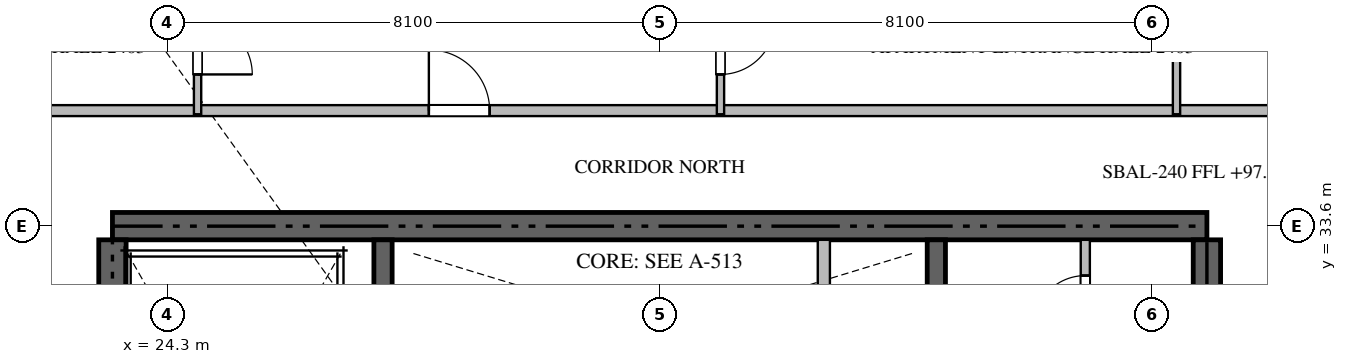
"""IFC4 building model, lengths in metres.
Left out: names, types, materials, properties, quantities, classifications, styles, units other than length and angle.
Written with IfcOpenShell. Run it as: python <this file> out.ifc"""

import sys

from ifc_helpers import new_model, si_unit, direction, frame, frame_2d, origin, place, context, subcontext, project, spatial, rectangle, extrude, source, transform, mapped, element, fill, save


model = new_model("IFC4")
c1 = context("Model", 3, precision=1e-05, world=origin(), true_north=direction((0.0, 1.0)))
c2 = subcontext(c1, "Body", "Model", "MODEL_VIEW")
j1 = project(units=[si_unit("LENGTHUNIT", "METRE"), si_unit("PLANEANGLEUNIT", "RADIAN")], contexts=[c1])
p1 = place(None, origin())
s1 = spatial("IfcSite", under=j1, at=p1, CompositionType="ELEMENT")
p2 = place(p1, origin())
s2 = spatial("IfcBuilding", under=s1, at=p2, CompositionType="ELEMENT")
p3 = place(p2, frame((0.0, 0.0, 97.95)))
s3 = spatial("IfcBuildingStorey", under=s2, at=p3, CompositionType="ELEMENT", Elevation=97.95)
p4 = place(p3, frame((41.4, 33.6, -0.26), z_axis=(0.0, 0.0, 1.0), x_axis=(-1.0, 0.0, 0.0)))
e1 = element("IfcWall", 1, at=p4, inside=s3, PredefinedType="SHEAR", context=c2, shape_type="SweptSolid", body=[
    extrude(rectangle(XDim=18.0, YDim=0.45, at=frame_2d((9.0, 0.0))), origin(), (0.0, 0.0, 1.0), 3.748),
])
p5 = place(p3, frame((23.4, 24.25, -0.26), z_axis=(0.0, 0.0, 1.0), x_axis=(0.0, 1.0, 0.0)))
e2 = element("IfcWall", 2, at=p5, inside=s3, PredefinedType="SHEAR", context=c2, shape_type="SweptSolid", body=[
    extrude(rectangle(XDim=9.125, YDim=0.45, at=frame_2d((4.562, 0.0))), origin(), (0.0, 0.0, 1.0), 3.748),
])
p6 = place(p3, frame((41.4, 27.75, -0.26), z_axis=(0.0, 0.0, 1.0), x_axis=(0.0, 1.0, 0.0)))
e3 = element("IfcWall", 3, at=p6, inside=s3, PredefinedType="SHEAR", context=c2, shape_type="SweptSolid", body=[
    extrude(rectangle(XDim=5.625, YDim=0.45, at=frame_2d((2.812, 0.0))), origin(), (0.0, 0.0, 1.0), 3.748),
])
p7 = place(p3, frame((27.85, 23.55, -0.26), z_axis=(0.0, 0.0, 1.0), x_axis=(0.0, 1.0, 0.0)))
e4 = element("IfcWall", 4, at=p7, inside=s3, PredefinedType="SHEAR", context=c2, shape_type="SweptSolid", body=[
    extrude(rectangle(XDim=9.825, YDim=0.3, at=frame_2d((4.913, 0.0))), origin(), (0.0, 0.0, 1.0), 3.748),
])
p8 = place(p3, frame((36.95, 27.05, -0.26), z_axis=(0.0, 0.0, 1.0), x_axis=(0.0, 1.0, 0.0)))
e5 = element("IfcWall", 5, at=p8, inside=s3, PredefinedType="SHEAR", context=c2, shape_type="SweptSolid", body=[
    extrude(rectangle(XDim=6.325, YDim=0.3, at=frame_2d((3.163, 0.0))), origin(), (0.0, 0.0, 1.0), 3.748),
])
p9 = place(p3, frame((35.1, 30.75, 0.0), z_axis=(0.0, 0.0, 1.0), x_axis=(0.0, 1.0, 0.0)))
e6 = element("IfcWall", 6, at=p9, inside=s3, PredefinedType="STANDARD", context=c2, shape_type="SweptSolid", body=[
    extrude(rectangle(XDim=2.625, YDim=0.2, at=frame_2d((1.312, 0.0))), origin(), (0.0, 0.0, 1.0), 3.49),
])
p10 = place(p3, frame((39.4, 31.35, 0.0), z_axis=(0.0, 0.0, 1.0), x_axis=(0.0, 1.0, 0.0)))
e7 = element("IfcWall", 7, at=p10, inside=s3, PredefinedType="PARTITIONING", context=c2, shape_type="SweptSolid", body=[
    extrude(rectangle(XDim=2.025, YDim=0.15, at=frame_2d((1.012, 0.0))), origin(), (0.0, 0.0, 1.0), 3.49),
])
p11 = place(p10, frame((0.587, 0.0, 0.0)))
e8 = element("IfcOpeningElement", 8, at=p11, cuts=e7, PredefinedType="OPENING", context=c2, shape_type="SweptSolid", body=[
    extrude(rectangle(XDim=0.85, YDim=2.1, at=frame_2d((0.425, 1.05))), frame((0.0, 0.085, 0.0), z_axis=(0.0, -1.0, 0.0), x_axis=(1.0, 0.0, 0.0)), (0.0, 0.0, 1.0), 0.17),
])
p12 = place(p3, frame((21.402, 35.5, 0.0), z_axis=(0.0, 0.0, 1.0), x_axis=(1.0, 0.0, 0.0)))
e9 = element("IfcWall", 9, at=p12, inside=s3, PredefinedType="PARTITIONING", context=c2, shape_type="SweptSolid", body=[
    extrude(rectangle(XDim=21.996, YDim=0.18, at=frame_2d((10.998, 0.0))), origin(), (0.0, 0.0, 1.0), 3.49),
])
p13 = place(p12, frame((7.202, 0.0, 0.0)))
e10 = element("IfcOpeningElement", 10, at=p13, cuts=e9, PredefinedType="OPENING", context=c2, shape_type="SweptSolid", body=[
    extrude(rectangle(XDim=1.0, YDim=2.15, at=frame_2d((0.5, 1.075))), frame((0.0, 0.1, 0.0), z_axis=(0.0, -1.0, 0.0), x_axis=(1.0, 0.0, 0.0)), (0.0, 0.0, 1.0), 0.2),
])
p14 = place(p3, frame((24.8, 37.65, 0.0), z_axis=(0.0, 0.0, 1.0), x_axis=(0.0, -1.0, 0.0)))
e11 = element("IfcWall", 11, at=p14, inside=s3, PredefinedType="PARTITIONING", context=c2, shape_type="SweptSolid", body=[
    extrude(rectangle(XDim=2.21, YDim=0.12, at=frame_2d((1.105, 0.0))), origin(), (0.0, 0.0, 1.0), 3.49),
])
p15 = place(p14, frame((0.655, 0.0, 0.0)))
e12 = element("IfcOpeningElement", 12, at=p15, cuts=e11, PredefinedType="OPENING", context=c2, shape_type="SweptSolid", body=[
    extrude(rectangle(XDim=0.9, YDim=2.1, at=frame_2d((0.45, 1.05))), frame((0.0, 0.07, 0.0), z_axis=(0.0, -1.0, 0.0), x_axis=(1.0, 0.0, 0.0)), (0.0, 0.0, 1.0), 0.14),
])
p16 = place(p3, frame((33.4, 37.65, 0.0), z_axis=(0.0, 0.0, 1.0), x_axis=(0.0, -1.0, 0.0)))
e13 = element("IfcWall", 13, at=p16, inside=s3, PredefinedType="PARTITIONING", context=c2, shape_type="SweptSolid", body=[
    extrude(rectangle(XDim=2.21, YDim=0.12, at=frame_2d((1.105, 0.0))), origin(), (0.0, 0.0, 1.0), 3.49),
])
p17 = place(p16, frame((0.655, 0.0, 0.0)))
e14 = element("IfcOpeningElement", 14, at=p17, cuts=e13, PredefinedType="OPENING", context=c2, shape_type="SweptSolid", body=[
    extrude(rectangle(XDim=0.9, YDim=2.1, at=frame_2d((0.45, 1.05))), frame((0.0, 0.07, 0.0), z_axis=(0.0, -1.0, 0.0), x_axis=(1.0, 0.0, 0.0)), (0.0, 0.0, 1.0), 0.14),
])
p18 = place(p3, frame((40.9, 37.648, 0.0), z_axis=(0.0, 0.0, 1.0), x_axis=(0.0, -1.0, 0.0)))
e15 = element("IfcWall", 15, at=p18, inside=s3, PredefinedType="PARTITIONING", context=c2, shape_type="SweptSolid", body=[
    extrude(rectangle(XDim=2.208, YDim=0.12, at=frame_2d((1.104, 0.0))), origin(), (0.0, 0.0, 1.0), 3.49),
])
m1 = source(origin(), c2, "Body", "SweptSolid", [
    extrude(rectangle(XDim=0.85, YDim=2.1, at=frame_2d((0.425, 1.05))), frame((0.0, 0.025, 0.0), z_axis=(0.0, -1.0, 0.0), x_axis=(1.0, 0.0, 0.0)), (0.0, 0.0, 1.0), 0.05),
])
p19 = place(p11, origin())
e16 = element("IfcDoor", 16, at=p19, inside=s3, OperationType="SINGLE_SWING_LEFT", PredefinedType="DOOR", context=c2, shape_type="MappedRepresentation", body=[
    mapped(m1, transform((0.0, 0.0, 0.0), scale=1.0)),
])
fill(e8, e16)
m2 = source(origin(), c2, "Body", "SweptSolid", [
    extrude(rectangle(XDim=1.0, YDim=2.15, at=frame_2d((0.5, 1.075))), frame((0.0, 0.025, 0.0), z_axis=(0.0, -1.0, 0.0), x_axis=(1.0, 0.0, 0.0)), (0.0, 0.0, 1.0), 0.05),
])
p20 = place(p13, origin())
e17 = element("IfcDoor", 17, at=p20, inside=s3, OperationType="SINGLE_SWING_LEFT", PredefinedType="DOOR", context=c2, shape_type="MappedRepresentation", body=[
    mapped(m2, transform((0.0, 0.0, 0.0), scale=1.0)),
])
fill(e10, e17)
m3 = source(origin(), c2, "Body", "SweptSolid", [
    extrude(rectangle(XDim=0.9, YDim=2.1, at=frame_2d((0.45, 1.05))), frame((0.0, 0.025, 0.0), z_axis=(0.0, -1.0, 0.0), x_axis=(1.0, 0.0, 0.0)), (0.0, 0.0, 1.0), 0.05),
])
p21 = place(p15, origin())
e18 = element("IfcDoor", 18, at=p21, inside=s3, OperationType="SINGLE_SWING_RIGHT", PredefinedType="DOOR", context=c2, shape_type="MappedRepresentation", body=[
    mapped(m3, transform((0.0, 0.0, 0.0), scale=1.0)),
])
fill(e12, e18)
p22 = place(p17, origin())
e19 = element("IfcDoor", 19, at=p22, inside=s3, OperationType="SINGLE_SWING_LEFT", PredefinedType="DOOR", context=c2, shape_type="MappedRepresentation", body=[
    mapped(m3, transform((0.0, 0.0, 0.0), scale=1.0)),
])
fill(e14, e19)
save(model, sys.argv[1])
